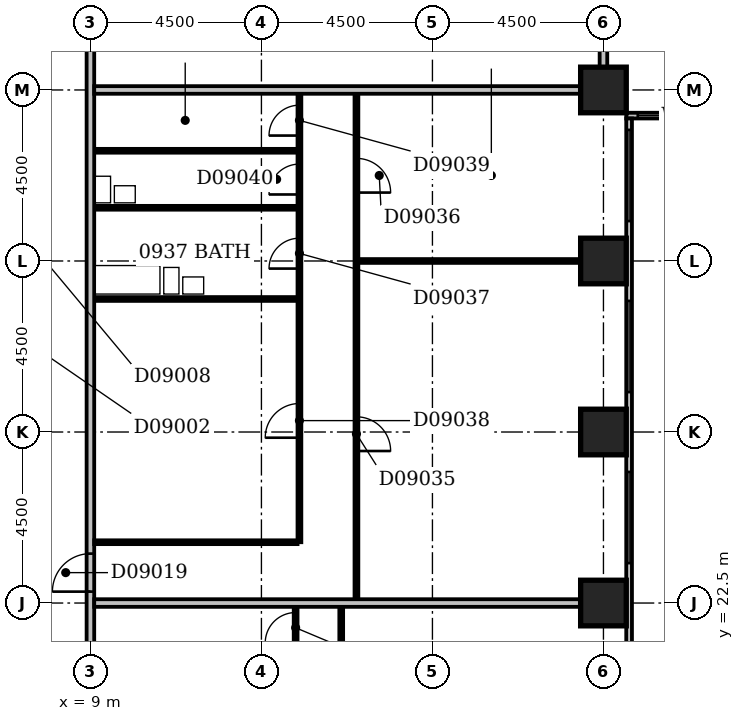
"""IFC4 building model, lengths in metres.
Left out: names, types, materials, properties, quantities, classifications, styles, units other than length and angle.
Written with IfcOpenShell. Run it as: python <this file> out.ifc"""

import sys

from ifc_helpers import new_model, si_unit, direction, frame, frame_2d, origin, origin_2d, place, context, subcontext, project, spatial, rectangle, extrude, element, fill, save


model = new_model("IFC4")
c1 = context("Model", 3, precision=1e-05, world=origin(), true_north=direction((0.0, 1.0)))
c2 = subcontext(c1, "Body", "Model", "MODEL_VIEW")
j1 = project(units=[si_unit("LENGTHUNIT", "METRE"), si_unit("PLANEANGLEUNIT", "RADIAN")], contexts=[c1])
p1 = place(None, origin())
s1 = spatial("IfcSite", under=j1, at=p1, CompositionType="ELEMENT")
p2 = place(p1, origin())
s2 = spatial("IfcBuilding", under=s1, at=p2, CompositionType="ELEMENT")
p3 = place(p2, frame((0.0, 0.0, 43.4)))
s3 = spatial("IfcBuildingStorey", under=s2, at=p3, CompositionType="ELEMENT", Elevation=43.4)
for number, where, z_axis, x_axis in (
    (1, (22.5, 22.5, -0.3), (0.0, 0.0, 1.0), (1.0, 0.0, 0.0)),
    (2, (22.5, 27.0, -0.3), (0.0, 0.0, 1.0), (1.0, 0.0, 0.0)),
    (3, (22.5, 31.5, -0.3), (0.0, 0.0, 1.0), (1.0, 0.0, 0.0)),
    (4, (22.5, 36.0, -0.3), (0.0, 0.0, 1.0), (1.0, 0.0, 0.0)),
):
    element("IfcColumn", number, at=place(p3, frame(where, z_axis=z_axis, x_axis=x_axis)), inside=s3, PredefinedType="COLUMN", context=c2, shape_type="SweptSolid", body=[
        extrude(rectangle(XDim=1.2, YDim=1.2, at=origin_2d()), origin(), (0.0, 0.0, 1.0), 3.6),
    ])
p4 = place(p3, frame((23.175, 17.4, 0.0), z_axis=(0.0, 0.0, 1.0), x_axis=(0.0, 1.0, 0.0)))
e5 = element("IfcWall", 5, at=p4, inside=s3, PredefinedType="STANDARD", context=c2, shape_type="SweptSolid", body=[
    extrude(rectangle(XDim=17.85, YDim=0.15, at=frame_2d((8.925, 0.0))), origin(), (0.0, 0.0, 1.0), 2.7),
])
p5 = place(p4, frame((1.548, 0.0, 0.6)))
e6 = element("IfcOpeningElement", 6, at=p5, cuts=e5, PredefinedType="OPENING", context=c2, shape_type="SweptSolid", body=[
    extrude(rectangle(XDim=1.8, YDim=1.8, at=frame_2d((0.9, 0.9))), frame((0.0, 0.087, 0.0), z_axis=(0.0, -1.0, 0.0), x_axis=(1.0, 0.0, 0.0)), (0.0, 0.0, 1.0), 0.174),
])
p6 = place(p4, frame((6.15, 0.0, 0.6)))
e7 = element("IfcOpeningElement", 7, at=p6, cuts=e5, PredefinedType="OPENING", context=c2, shape_type="SweptSolid", body=[
    extrude(rectangle(XDim=2.4, YDim=1.8, at=frame_2d((1.2, 0.9))), frame((0.0, 0.087, 0.0), z_axis=(0.0, -1.0, 0.0), x_axis=(1.0, 0.0, 0.0)), (0.0, 0.0, 1.0), 0.174),
])
p7 = place(p4, frame((10.65, 0.0, 0.6)))
e8 = element("IfcOpeningElement", 8, at=p7, cuts=e5, PredefinedType="OPENING", context=c2, shape_type="SweptSolid", body=[
    extrude(rectangle(XDim=2.4, YDim=1.8, at=frame_2d((1.2, 0.9))), frame((0.0, 0.087, 0.0), z_axis=(0.0, -1.0, 0.0), x_axis=(1.0, 0.0, 0.0)), (0.0, 0.0, 1.0), 0.174),
])
p8 = place(p4, frame((15.15, 0.0, 0.6)))
e9 = element("IfcOpeningElement", 9, at=p8, cuts=e5, PredefinedType="OPENING", context=c2, shape_type="SweptSolid", body=[
    extrude(rectangle(XDim=2.4, YDim=1.8, at=frame_2d((1.2, 0.9))), frame((0.0, 0.087, 0.0), z_axis=(0.0, -1.0, 0.0), x_axis=(1.0, 0.0, 0.0)), (0.0, 0.0, 1.0), 0.174),
])
p9 = place(p3, frame((23.1, 35.325, 0.0), z_axis=(0.0, 0.0, 1.0), x_axis=(1.0, 0.0, 0.0)))
e10 = element("IfcWall", 10, at=p9, inside=s3, PredefinedType="STANDARD", context=c2, shape_type="SweptSolid", body=[
    extrude(rectangle(XDim=45.15, YDim=0.15, at=frame_2d((22.575, 0.0))), origin(), (0.0, 0.0, 1.0), 2.7),
])
p10 = place(p9, frame((0.303, 0.0, 0.6)))
e11 = element("IfcOpeningElement", 11, at=p10, cuts=e10, PredefinedType="OPENING", context=c2, shape_type="SweptSolid", body=[
    extrude(rectangle(XDim=2.1, YDim=1.8, at=frame_2d((1.05, 0.9))), frame((0.0, 0.087, 0.0), z_axis=(0.0, -1.0, 0.0), x_axis=(1.0, 0.0, 0.0)), (0.0, 0.0, 1.0), 0.174),
])
p11 = place(p9, frame((4.95, 0.0, 0.6)))
e12 = element("IfcOpeningElement", 12, at=p11, cuts=e10, PredefinedType="OPENING", context=c2, shape_type="SweptSolid", body=[
    extrude(rectangle(XDim=2.4, YDim=1.8, at=frame_2d((1.2, 0.9))), frame((0.0, 0.087, 0.0), z_axis=(0.0, -1.0, 0.0), x_axis=(1.0, 0.0, 0.0)), (0.0, 0.0, 1.0), 0.174),
])
p12 = place(p9, frame((9.45, 0.0, 0.6)))
e13 = element("IfcOpeningElement", 13, at=p12, cuts=e10, PredefinedType="OPENING", context=c2, shape_type="SweptSolid", body=[
    extrude(rectangle(XDim=2.4, YDim=1.8, at=frame_2d((1.2, 0.9))), frame((0.0, 0.087, 0.0), z_axis=(0.0, -1.0, 0.0), x_axis=(1.0, 0.0, 0.0)), (0.0, 0.0, 1.0), 0.174),
])
p13 = place(p9, frame((13.95, 0.0, 0.6)))
e14 = element("IfcOpeningElement", 14, at=p13, cuts=e10, PredefinedType="OPENING", context=c2, shape_type="SweptSolid", body=[
    extrude(rectangle(XDim=2.4, YDim=1.8, at=frame_2d((1.2, 0.9))), frame((0.0, 0.087, 0.0), z_axis=(0.0, -1.0, 0.0), x_axis=(1.0, 0.0, 0.0)), (0.0, 0.0, 1.0), 0.174),
])
p14 = place(p9, frame((18.45, 0.0, 0.6)))
e15 = element("IfcOpeningElement", 15, at=p14, cuts=e10, PredefinedType="OPENING", context=c2, shape_type="SweptSolid", body=[
    extrude(rectangle(XDim=2.4, YDim=1.8, at=frame_2d((1.2, 0.9))), frame((0.0, 0.087, 0.0), z_axis=(0.0, -1.0, 0.0), x_axis=(1.0, 0.0, 0.0)), (0.0, 0.0, 1.0), 0.174),
])
p15 = place(p9, frame((24.277, 0.0, 0.6)))
e16 = element("IfcOpeningElement", 16, at=p15, cuts=e10, PredefinedType="OPENING", context=c2, shape_type="SweptSolid", body=[
    extrude(rectangle(XDim=1.2, YDim=1.8, at=frame_2d((0.6, 0.9))), frame((0.0, 0.087, 0.0), z_axis=(0.0, -1.0, 0.0), x_axis=(1.0, 0.0, 0.0)), (0.0, 0.0, 1.0), 0.174),
])
p16 = place(p9, frame((27.297, 0.0, 0.6)))
e17 = element("IfcOpeningElement", 17, at=p16, cuts=e10, PredefinedType="OPENING", context=c2, shape_type="SweptSolid", body=[
    extrude(rectangle(XDim=2.1, YDim=1.8, at=frame_2d((1.05, 0.9))), frame((0.0, 0.087, 0.0), z_axis=(0.0, -1.0, 0.0), x_axis=(1.0, 0.0, 0.0)), (0.0, 0.0, 1.0), 0.174),
])
p17 = place(p9, frame((31.95, 0.0, 0.6)))
e18 = element("IfcOpeningElement", 18, at=p17, cuts=e10, PredefinedType="OPENING", context=c2, shape_type="SweptSolid", body=[
    extrude(rectangle(XDim=2.4, YDim=1.8, at=frame_2d((1.2, 0.9))), frame((0.0, 0.087, 0.0), z_axis=(0.0, -1.0, 0.0), x_axis=(1.0, 0.0, 0.0)), (0.0, 0.0, 1.0), 0.174),
])
p18 = place(p9, frame((36.45, 0.0, 0.6)))
e19 = element("IfcOpeningElement", 19, at=p18, cuts=e10, PredefinedType="OPENING", context=c2, shape_type="SweptSolid", body=[
    extrude(rectangle(XDim=2.4, YDim=1.8, at=frame_2d((1.2, 0.9))), frame((0.0, 0.087, 0.0), z_axis=(0.0, -1.0, 0.0), x_axis=(1.0, 0.0, 0.0)), (0.0, 0.0, 1.0), 0.174),
])
p19 = place(p9, frame((40.95, 0.0, 0.6)))
e20 = element("IfcOpeningElement", 20, at=p19, cuts=e10, PredefinedType="OPENING", context=c2, shape_type="SweptSolid", body=[
    extrude(rectangle(XDim=2.4, YDim=1.8, at=frame_2d((1.2, 0.9))), frame((0.0, 0.087, 0.0), z_axis=(0.0, -1.0, 0.0), x_axis=(1.0, 0.0, 0.0)), (0.0, 0.0, 1.0), 0.174),
])
p20 = place(p3, frame((9.0, 5.0, 0.0), z_axis=(0.0, 0.0, 1.0), x_axis=(0.0, 1.0, 0.0)))
e21 = element("IfcWall", 21, at=p20, inside=s3, PredefinedType="PARTITIONING", context=c2, shape_type="SweptSolid", body=[
    extrude(rectangle(XDim=44.5, YDim=0.2, at=frame_2d((22.25, 0.0))), origin(), (0.0, 0.0, 1.0), 3.3),
])
p21 = place(p20, frame((17.8, 0.0, 0.0)))
e22 = element("IfcOpeningElement", 22, at=p21, cuts=e21, PredefinedType="OPENING", context=c2, shape_type="SweptSolid", body=[
    extrude(rectangle(XDim=1.0, YDim=2.1, at=frame_2d((0.5, 1.05))), frame((0.0, 0.112, 0.0), z_axis=(0.0, -1.0, 0.0), x_axis=(1.0, 0.0, 0.0)), (0.0, 0.0, 1.0), 0.224),
])
p22 = place(p20, frame((14.95, 0.0, 0.0)))
e23 = element("IfcOpeningElement", 23, at=p22, cuts=e21, PredefinedType="OPENING", context=c2, shape_type="SweptSolid", body=[
    extrude(rectangle(XDim=1.0, YDim=2.1, at=frame_2d((0.5, 1.05))), frame((0.0, 0.112, 0.0), z_axis=(0.0, -1.0, 0.0), x_axis=(1.0, 0.0, 0.0)), (0.0, 0.0, 1.0), 0.224),
])
p23 = place(p20, frame((10.45, 0.0, 0.0)))
e24 = element("IfcOpeningElement", 24, at=p23, cuts=e21, PredefinedType="OPENING", context=c2, shape_type="SweptSolid", body=[
    extrude(rectangle(XDim=1.0, YDim=2.1, at=frame_2d((0.5, 1.05))), frame((0.0, 0.112, 0.0), z_axis=(0.0, -1.0, 0.0), x_axis=(1.0, 0.0, 0.0)), (0.0, 0.0, 1.0), 0.224),
])
p24 = place(p20, frame((5.95, 0.0, 0.0)))
e25 = element("IfcOpeningElement", 25, at=p24, cuts=e21, PredefinedType="OPENING", context=c2, shape_type="SweptSolid", body=[
    extrude(rectangle(XDim=1.0, YDim=2.1, at=frame_2d((0.5, 1.05))), frame((0.0, 0.112, 0.0), z_axis=(0.0, -1.0, 0.0), x_axis=(1.0, 0.0, 0.0)), (0.0, 0.0, 1.0), 0.224),
])
p25 = place(p20, frame((32.75, 0.0, 0.0)))
e26 = element("IfcOpeningElement", 26, at=p25, cuts=e21, PredefinedType="OPENING", context=c2, shape_type="SweptSolid", body=[
    extrude(rectangle(XDim=0.9, YDim=2.1, at=frame_2d((0.45, 1.05))), frame((0.0, 0.112, 0.0), z_axis=(0.0, -1.0, 0.0), x_axis=(1.0, 0.0, 0.0)), (0.0, 0.0, 1.0), 0.224),
])
p26 = place(p20, frame((1.5, 0.0, 0.0)))
e27 = element("IfcOpeningElement", 27, at=p26, cuts=e21, PredefinedType="OPENING", context=c2, shape_type="SweptSolid", body=[
    extrude(rectangle(XDim=0.9, YDim=2.1, at=frame_2d((0.45, 1.05))), frame((0.0, 0.112, 0.0), z_axis=(0.0, -1.0, 0.0), x_axis=(1.0, 0.0, 0.0)), (0.0, 0.0, 1.0), 0.224),
])
p27 = place(p3, frame((15.6, 18.1, 0.0), z_axis=(0.0, 0.0, 1.0), x_axis=(0.0, 1.0, 0.0)))
e28 = element("IfcWall", 28, at=p27, inside=s3, PredefinedType="PARTITIONING", context=c2, shape_type="SweptSolid", body=[
    extrude(rectangle(XDim=4.3, YDim=0.1, at=frame_2d((2.15, 0.0))), origin(), (0.0, 0.0, 1.0), 3.3),
])
p28 = place(p27, frame((1.7, 0.0, 0.0)))
e29 = element("IfcOpeningElement", 29, at=p28, cuts=e28, PredefinedType="OPENING", context=c2, shape_type="SweptSolid", body=[
    extrude(rectangle(XDim=0.9, YDim=2.1, at=frame_2d((0.45, 1.05))), frame((0.0, 0.062, 0.0), z_axis=(0.0, -1.0, 0.0), x_axis=(1.0, 0.0, 0.0)), (0.0, 0.0, 1.0), 0.124),
])
p29 = place(p3, frame((14.4, 21.2, 0.0), z_axis=(0.0, 0.0, 1.0), x_axis=(0.0, 1.0, 0.0)))
e30 = element("IfcWall", 30, at=p29, inside=s3, PredefinedType="PARTITIONING", context=c2, shape_type="SweptSolid", body=[
    extrude(rectangle(XDim=1.2, YDim=0.1, at=frame_2d((0.6, 0.0))), origin(), (0.0, 0.0, 1.0), 3.3),
])
p30 = place(p29, frame((0.25, 0.0, 0.0)))
e31 = element("IfcOpeningElement", 31, at=p30, cuts=e30, PredefinedType="OPENING", context=c2, shape_type="SweptSolid", body=[
    extrude(rectangle(XDim=0.8, YDim=2.1, at=frame_2d((0.4, 1.05))), frame((0.0, 0.062, 0.0), z_axis=(0.0, -1.0, 0.0), x_axis=(1.0, 0.0, 0.0)), (0.0, 0.0, 1.0), 0.124),
])
p31 = place(p3, frame((9.1, 22.5, 0.0), z_axis=(0.0, 0.0, 1.0), x_axis=(1.0, 0.0, 0.0)))
e32 = element("IfcWall", 32, at=p31, inside=s3, PredefinedType="PARTITIONING", context=c2, shape_type="SweptSolid", body=[
    extrude(rectangle(XDim=12.8, YDim=0.2, at=frame_2d((6.4, 0.0))), origin(), (0.0, 0.0, 1.0), 3.3),
])
p32 = place(p3, frame((16.0, 22.6, 0.0), z_axis=(0.0, 0.0, 1.0), x_axis=(0.0, 1.0, 0.0)))
e33 = element("IfcWall", 33, at=p32, inside=s3, PredefinedType="PARTITIONING", context=c2, shape_type="SweptSolid", body=[
    extrude(rectangle(XDim=13.3, YDim=0.1, at=frame_2d((6.65, 0.0))), origin(), (0.0, 0.0, 1.0), 3.3),
])
p33 = place(p32, frame((3.9, 0.0, 0.0)))
e34 = element("IfcOpeningElement", 34, at=p33, cuts=e33, PredefinedType="OPENING", context=c2, shape_type="SweptSolid", body=[
    extrude(rectangle(XDim=0.9, YDim=2.1, at=frame_2d((0.45, 1.05))), frame((0.0, 0.062, 0.0), z_axis=(0.0, -1.0, 0.0), x_axis=(1.0, 0.0, 0.0)), (0.0, 0.0, 1.0), 0.124),
])
p34 = place(p32, frame((10.7, 0.0, 0.0)))
e35 = element("IfcOpeningElement", 35, at=p34, cuts=e33, PredefinedType="OPENING", context=c2, shape_type="SweptSolid", body=[
    extrude(rectangle(XDim=0.9, YDim=2.1, at=frame_2d((0.45, 1.05))), frame((0.0, 0.062, 0.0), z_axis=(0.0, -1.0, 0.0), x_axis=(1.0, 0.0, 0.0)), (0.0, 0.0, 1.0), 0.124),
])
p35 = place(p3, frame((9.1, 24.1, 0.0), z_axis=(0.0, 0.0, 1.0), x_axis=(1.0, 0.0, 0.0)))
e36 = element("IfcWall", 36, at=p35, inside=s3, PredefinedType="PARTITIONING", context=c2, shape_type="SweptSolid", body=[
    extrude(rectangle(XDim=5.35, YDim=0.1, at=frame_2d((2.675, 0.0))), origin(), (0.0, 0.0, 1.0), 3.3),
])
p36 = place(p3, frame((14.5, 24.1, 0.0), z_axis=(0.0, 0.0, 1.0), x_axis=(0.0, 1.0, 0.0)))
e37 = element("IfcWall", 37, at=p36, inside=s3, PredefinedType="PARTITIONING", context=c2, shape_type="SweptSolid", body=[
    extrude(rectangle(XDim=11.8, YDim=0.1, at=frame_2d((5.9, 0.0))), origin(), (0.0, 0.0, 1.0), 3.3),
])
p37 = place(p36, frame((7.2, 0.0, 0.0)))
e38 = element("IfcOpeningElement", 38, at=p37, cuts=e37, PredefinedType="OPENING", context=c2, shape_type="SweptSolid", body=[
    extrude(rectangle(XDim=0.8, YDim=2.1, at=frame_2d((0.4, 1.05))), frame((0.0, 0.062, 0.0), z_axis=(0.0, -1.0, 0.0), x_axis=(1.0, 0.0, 0.0)), (0.0, 0.0, 1.0), 0.124),
])
p38 = place(p36, frame((2.75, 0.0, 0.0)))
e39 = element("IfcOpeningElement", 39, at=p38, cuts=e37, PredefinedType="OPENING", context=c2, shape_type="SweptSolid", body=[
    extrude(rectangle(XDim=0.9, YDim=2.1, at=frame_2d((0.45, 1.05))), frame((0.0, 0.062, 0.0), z_axis=(0.0, -1.0, 0.0), x_axis=(1.0, 0.0, 0.0)), (0.0, 0.0, 1.0), 0.124),
])
p39 = place(p36, frame((10.7, 0.0, 0.0)))
e40 = element("IfcOpeningElement", 40, at=p39, cuts=e37, PredefinedType="OPENING", context=c2, shape_type="SweptSolid", body=[
    extrude(rectangle(XDim=0.8, YDim=2.1, at=frame_2d((0.4, 1.05))), frame((0.0, 0.062, 0.0), z_axis=(0.0, -1.0, 0.0), x_axis=(1.0, 0.0, 0.0)), (0.0, 0.0, 1.0), 0.124),
])
p40 = place(p36, frame((9.15, 0.0, 0.0)))
e41 = element("IfcOpeningElement", 41, at=p40, cuts=e37, PredefinedType="OPENING", context=c2, shape_type="SweptSolid", body=[
    extrude(rectangle(XDim=0.8, YDim=2.1, at=frame_2d((0.4, 1.05))), frame((0.0, 0.062, 0.0), z_axis=(0.0, -1.0, 0.0), x_axis=(1.0, 0.0, 0.0)), (0.0, 0.0, 1.0), 0.124),
])
p41 = place(p3, frame((9.1, 30.5, 0.0), z_axis=(0.0, 0.0, 1.0), x_axis=(1.0, 0.0, 0.0)))
e42 = element("IfcWall", 42, at=p41, inside=s3, PredefinedType="PLUMBINGWALL", context=c2, shape_type="SweptSolid", body=[
    extrude(rectangle(XDim=5.35, YDim=0.1, at=frame_2d((2.675, 0.0))), origin(), (0.0, 0.0, 1.0), 3.3),
])
p42 = place(p3, frame((16.05, 31.5, 0.0), z_axis=(0.0, 0.0, 1.0), x_axis=(1.0, 0.0, 0.0)))
e43 = element("IfcWall", 43, at=p42, inside=s3, PredefinedType="PARTITIONING", context=c2, shape_type="SweptSolid", body=[
    extrude(rectangle(XDim=5.85, YDim=0.1, at=frame_2d((2.925, 0.0))), origin(), (0.0, 0.0, 1.0), 3.3),
])
for number, where, z_axis, x_axis in (
    (44, (9.1, 32.9, 0.0), (0.0, 0.0, 1.0), (1.0, 0.0, 0.0)),
    (45, (9.1, 34.4, 0.0), (0.0, 0.0, 1.0), (1.0, 0.0, 0.0)),
):
    element("IfcWall", number, at=place(p3, frame(where, z_axis=z_axis, x_axis=x_axis)), inside=s3, PredefinedType="PLUMBINGWALL", context=c2, shape_type="SweptSolid", body=[
        extrude(rectangle(XDim=5.35, YDim=0.1, at=frame_2d((2.675, 0.0))), origin(), (0.0, 0.0, 1.0), 3.3),
    ])
p43 = place(p3, frame((9.1, 36.0, 0.0), z_axis=(0.0, 0.0, 1.0), x_axis=(1.0, 0.0, 0.0)))
e46 = element("IfcWall", 46, at=p43, inside=s3, PredefinedType="PARTITIONING", context=c2, shape_type="SweptSolid", body=[
    extrude(rectangle(XDim=12.8, YDim=0.2, at=frame_2d((6.4, 0.0))), origin(), (0.0, 0.0, 1.0), 2.4),
])
p44 = place(p3, frame((22.5, 36.6, 0.0), z_axis=(0.0, 0.0, 1.0), x_axis=(0.0, 1.0, 0.0)))
e47 = element("IfcWall", 47, at=p44, inside=s3, PredefinedType="PARTITIONING", context=c2, shape_type="SweptSolid", body=[
    extrude(rectangle(XDim=12.8, YDim=0.2, at=frame_2d((6.4, 0.0))), origin(), (0.0, 0.0, 1.0), 3.3),
])
p45 = place(p6, origin())
e48 = element("IfcWindow", 48, at=p45, inside=s3, PartitioningType="SINGLE_PANEL", PredefinedType="WINDOW", context=c2, shape_type="SweptSolid", body=[
    extrude(rectangle(XDim=2.4, YDim=1.8, at=frame_2d((1.2, 0.9))), frame((0.0, 0.03, 0.0), z_axis=(0.0, -1.0, 0.0), x_axis=(1.0, 0.0, 0.0)), (0.0, 0.0, 1.0), 0.06),
])
fill(e7, e48)
p46 = place(p7, origin())
e49 = element("IfcWindow", 49, at=p46, inside=s3, PartitioningType="SINGLE_PANEL", PredefinedType="WINDOW", context=c2, shape_type="SweptSolid", body=[
    extrude(rectangle(XDim=2.4, YDim=1.8, at=frame_2d((1.2, 0.9))), frame((0.0, 0.03, 0.0), z_axis=(0.0, -1.0, 0.0), x_axis=(1.0, 0.0, 0.0)), (0.0, 0.0, 1.0), 0.06),
])
fill(e8, e49)
p47 = place(p8, origin())
e50 = element("IfcWindow", 50, at=p47, inside=s3, PartitioningType="SINGLE_PANEL", PredefinedType="WINDOW", context=c2, shape_type="SweptSolid", body=[
    extrude(rectangle(XDim=2.4, YDim=1.8, at=frame_2d((1.2, 0.9))), frame((0.0, 0.03, 0.0), z_axis=(0.0, -1.0, 0.0), x_axis=(1.0, 0.0, 0.0)), (0.0, 0.0, 1.0), 0.06),
])
fill(e9, e50)
p48 = place(p10, origin())
e51 = element("IfcWindow", 51, at=p48, inside=s3, PartitioningType="SINGLE_PANEL", PredefinedType="WINDOW", context=c2, shape_type="SweptSolid", body=[
    extrude(rectangle(XDim=2.1, YDim=1.8, at=frame_2d((1.05, 0.9))), frame((0.0, 0.03, 0.0), z_axis=(0.0, -1.0, 0.0), x_axis=(1.0, 0.0, 0.0)), (0.0, 0.0, 1.0), 0.06),
])
fill(e11, e51)
p49 = place(p21, origin())
e52 = element("IfcDoor", 52, at=p49, inside=s3, OperationType="SINGLE_SWING_LEFT", PredefinedType="DOOR", context=c2, shape_type="SweptSolid", body=[
    extrude(rectangle(XDim=1.0, YDim=2.1, at=frame_2d((0.5, 1.05))), frame((0.0, 0.025, 0.0), z_axis=(0.0, -1.0, 0.0), x_axis=(1.0, 0.0, 0.0)), (0.0, 0.0, 1.0), 0.05),
])
fill(e22, e52)
p50 = place(p30, origin())
e53 = element("IfcDoor", 53, at=p50, inside=s3, OperationType="SINGLE_SWING_LEFT", PredefinedType="DOOR", context=c2, shape_type="SweptSolid", body=[
    extrude(rectangle(XDim=0.8, YDim=2.1, at=frame_2d((0.4, 1.05))), frame((0.0, 0.025, 0.0), z_axis=(0.0, -1.0, 0.0), x_axis=(1.0, 0.0, 0.0)), (0.0, 0.0, 1.0), 0.05),
])
fill(e31, e53)
p51 = place(p33, frame((0.9, 0.0, 0.0), z_axis=(0.0, 0.0, 1.0), x_axis=(-1.0, 0.0, 0.0)))
e54 = element("IfcDoor", 54, at=p51, inside=s3, OperationType="SINGLE_SWING_RIGHT", PredefinedType="DOOR", context=c2, shape_type="SweptSolid", body=[
    extrude(rectangle(XDim=0.9, YDim=2.1, at=frame_2d((0.45, 1.05))), frame((0.0, 0.025, 0.0), z_axis=(0.0, -1.0, 0.0), x_axis=(1.0, 0.0, 0.0)), (0.0, 0.0, 1.0), 0.05),
])
fill(e34, e54)
p52 = place(p34, frame((0.9, 0.0, 0.0), z_axis=(0.0, 0.0, 1.0), x_axis=(-1.0, 0.0, 0.0)))
e55 = element("IfcDoor", 55, at=p52, inside=s3, OperationType="SINGLE_SWING_RIGHT", PredefinedType="DOOR", context=c2, shape_type="SweptSolid", body=[
    extrude(rectangle(XDim=0.9, YDim=2.1, at=frame_2d((0.45, 1.05))), frame((0.0, 0.025, 0.0), z_axis=(0.0, -1.0, 0.0), x_axis=(1.0, 0.0, 0.0)), (0.0, 0.0, 1.0), 0.05),
])
fill(e35, e55)
p53 = place(p37, origin())
e56 = element("IfcDoor", 56, at=p53, inside=s3, OperationType="SINGLE_SWING_LEFT", PredefinedType="DOOR", context=c2, shape_type="SweptSolid", body=[
    extrude(rectangle(XDim=0.8, YDim=2.1, at=frame_2d((0.4, 1.05))), frame((0.0, 0.025, 0.0), z_axis=(0.0, -1.0, 0.0), x_axis=(1.0, 0.0, 0.0)), (0.0, 0.0, 1.0), 0.05),
])
fill(e38, e56)
p54 = place(p38, origin())
e57 = element("IfcDoor", 57, at=p54, inside=s3, OperationType="SINGLE_SWING_LEFT", PredefinedType="DOOR", context=c2, shape_type="SweptSolid", body=[
    extrude(rectangle(XDim=0.9, YDim=2.1, at=frame_2d((0.45, 1.05))), frame((0.0, 0.025, 0.0), z_axis=(0.0, -1.0, 0.0), x_axis=(1.0, 0.0, 0.0)), (0.0, 0.0, 1.0), 0.05),
])
fill(e39, e57)
p55 = place(p39, origin())
e58 = element("IfcDoor", 58, at=p55, inside=s3, OperationType="SINGLE_SWING_LEFT", PredefinedType="DOOR", context=c2, shape_type="SweptSolid", body=[
    extrude(rectangle(XDim=0.8, YDim=2.1, at=frame_2d((0.4, 1.05))), frame((0.0, 0.025, 0.0), z_axis=(0.0, -1.0, 0.0), x_axis=(1.0, 0.0, 0.0)), (0.0, 0.0, 1.0), 0.05),
])
fill(e40, e58)
p56 = place(p40, origin())
e59 = element("IfcDoor", 59, at=p56, inside=s3, OperationType="SINGLE_SWING_LEFT", PredefinedType="DOOR", context=c2, shape_type="SweptSolid", body=[
    extrude(rectangle(XDim=0.8, YDim=2.1, at=frame_2d((0.4, 1.05))), frame((0.0, 0.025, 0.0), z_axis=(0.0, -1.0, 0.0), x_axis=(1.0, 0.0, 0.0)), (0.0, 0.0, 1.0), 0.05),
])
fill(e41, e59)
save(model, sys.argv[1])
